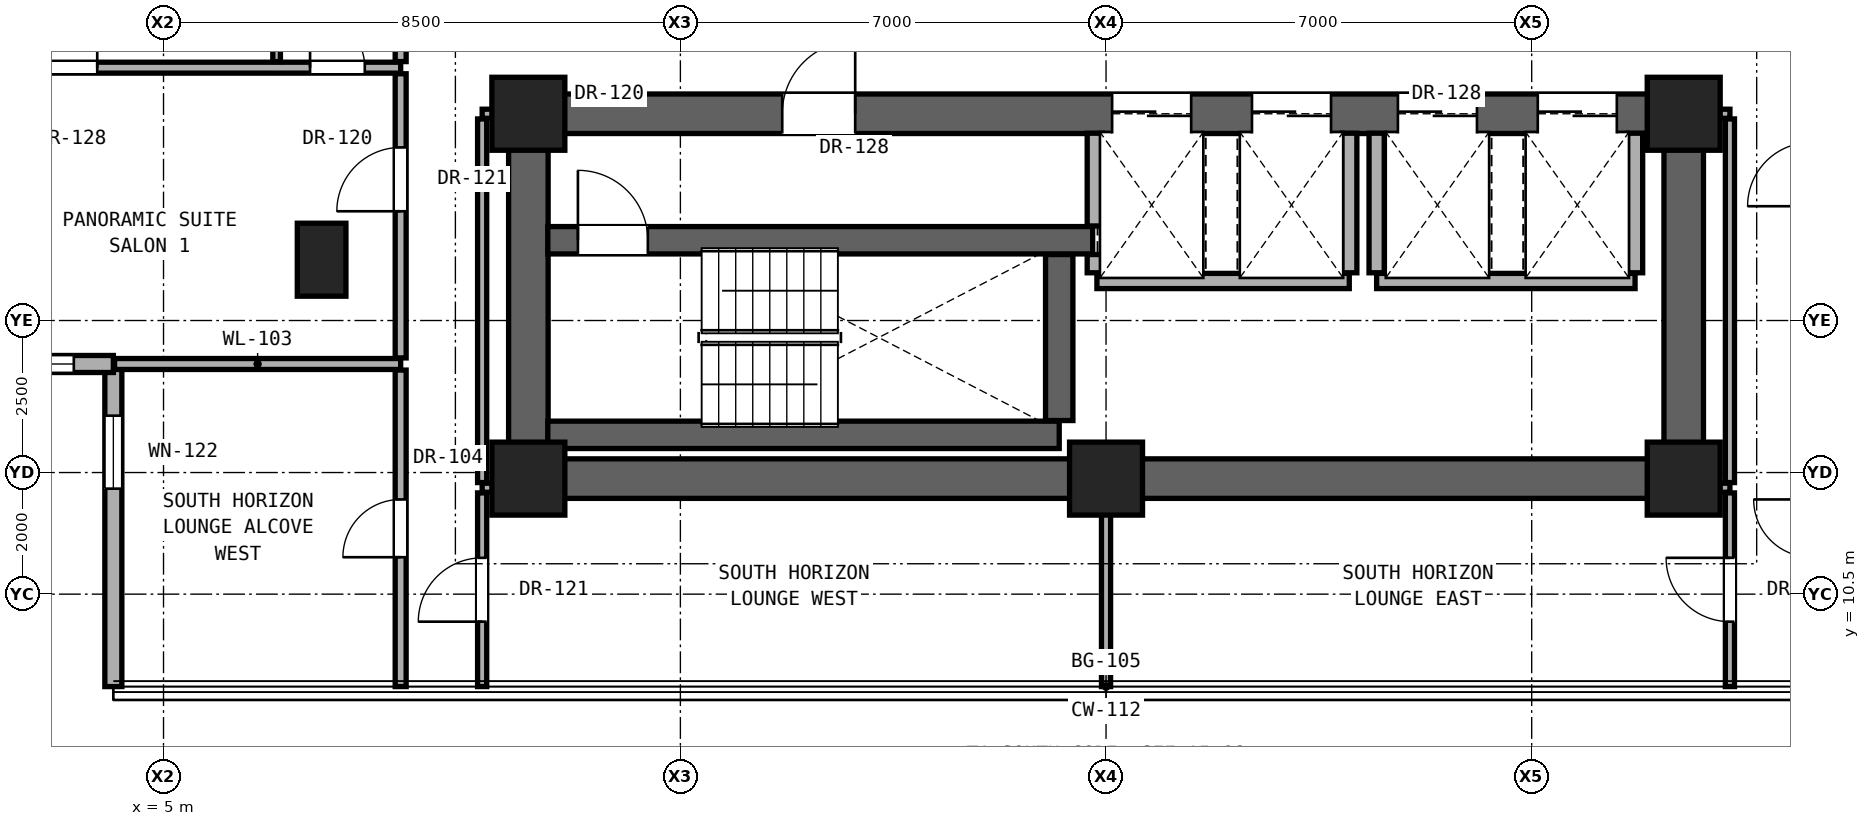
"""IFC4 building model, lengths in metres.
Left out: names, types, materials, properties, quantities, classifications, styles, units other than length and angle.
Written with IfcOpenShell. Run it as: python <this file> out.ifc"""

import sys

from ifc_helpers import new_model, si_unit, direction, frame, frame_2d, origin, origin_2d, place, context, subcontext, project, spatial, rectangle, extrude, element, fill, save


model = new_model("IFC4")
c1 = context("Model", 3, precision=1e-05, world=origin(), true_north=direction((0.0, 1.0)))
c2 = subcontext(c1, "Body", "Model", "MODEL_VIEW")
j1 = project(units=[si_unit("LENGTHUNIT", "METRE"), si_unit("PLANEANGLEUNIT", "RADIAN")], contexts=[c1])
p1 = place(None, origin())
s1 = spatial("IfcSite", under=j1, at=p1, CompositionType="ELEMENT")
p2 = place(p1, origin())
s2 = spatial("IfcBuilding", under=s1, at=p2, CompositionType="ELEMENT")
p3 = place(p2, frame((0.0, 0.0, 104.9)))
s3 = spatial("IfcBuildingStorey", under=s2, at=p3, CompositionType="ELEMENT", Elevation=104.9)
for number, where, z_axis, x_axis in (
    (1, (11.0, 12.4, 0.0), (0.0, 0.0, 1.0), (1.0, 0.0, 0.0)),
    (2, (20.5, 12.4, 0.0), (0.0, 0.0, 1.0), (1.0, 0.0, 0.0)),
    (3, (30.0, 12.4, 0.0), (0.0, 0.0, 1.0), (1.0, 0.0, 0.0)),
    (4, (11.0, 18.4, 0.0), (0.0, 0.0, 1.0), (1.0, 0.0, 0.0)),
    (5, (30.0, 18.4, 0.0), (0.0, 0.0, 1.0), (1.0, 0.0, 0.0)),
):
    element("IfcColumn", number, at=place(p3, frame(where, z_axis=z_axis, x_axis=x_axis)), inside=s3, PredefinedType="COLUMN", context=c2, shape_type="SweptSolid", body=[
        extrude(rectangle(XDim=1.2, YDim=1.2, at=origin_2d()), origin(), (0.0, 0.0, 1.0), 3.3),
    ])
p4 = place(p3, frame((7.6, 16.0, 0.0), z_axis=(0.0, 0.0, 1.0), x_axis=(1.0, 0.0, 0.0)))
e6 = element("IfcColumn", 6, at=p4, inside=s3, PredefinedType="PILASTER", context=c2, shape_type="SweptSolid", body=[
    extrude(rectangle(XDim=0.8, YDim=1.2, at=origin_2d()), origin(), (0.0, 0.0, 1.0), 3.3),
])
p5 = place(p3, frame((11.0, 12.4, 0.0), z_axis=(0.0, 0.0, 1.0), x_axis=(1.0, 0.0, 0.0)))
e7 = element("IfcWall", 7, at=p5, inside=s3, PredefinedType="SHEAR", context=c2, shape_type="SweptSolid", body=[
    extrude(rectangle(XDim=19.0, YDim=0.65, at=frame_2d((9.5, 0.0))), origin(), (0.0, 0.0, 1.0), 3.08),
])
for number, where, z_axis, x_axis in (
    (8, (11.0, 12.4, 0.0), (0.0, 0.0, 1.0), (0.0, 1.0, 0.0)),
    (9, (30.0, 12.4, 0.0), (0.0, 0.0, 1.0), (0.0, 1.0, 0.0)),
):
    element("IfcWall", number, at=place(p3, frame(where, z_axis=z_axis, x_axis=x_axis)), inside=s3, PredefinedType="SHEAR", context=c2, shape_type="SweptSolid", body=[
        extrude(rectangle(XDim=6.0, YDim=0.65, at=frame_2d((3.0, 0.0))), origin(), (0.0, 0.0, 1.0), 3.08),
    ])
p6 = place(p3, frame((11.0, 18.4, 0.0), z_axis=(0.0, 0.0, 1.0), x_axis=(1.0, 0.0, 0.0)))
e10 = element("IfcWall", 10, at=p6, inside=s3, PredefinedType="SHEAR", context=c2, shape_type="SweptSolid", body=[
    extrude(rectangle(XDim=19.0, YDim=0.65, at=frame_2d((9.5, 0.0))), origin(), (0.0, 0.0, 1.0), 3.08),
])
p7 = place(p6, frame((4.175, 0.0, 0.0)))
e11 = element("IfcOpeningElement", 11, at=p7, cuts=e10, PredefinedType="OPENING", context=c2, shape_type="SweptSolid", body=[
    extrude(rectangle(XDim=1.2, YDim=2.25, at=frame_2d((0.6, 1.125))), frame((0.0, 0.335, 0.0), z_axis=(0.0, -1.0, 0.0), x_axis=(1.0, 0.0, 0.0)), (0.0, 0.0, 1.0), 0.67),
])
p8 = place(p6, frame((9.6, 0.0, 0.0)))
e12 = element("IfcOpeningElement", 12, at=p8, cuts=e10, PredefinedType="OPENING", context=c2, shape_type="SweptSolid", body=[
    extrude(rectangle(XDim=1.3, YDim=2.3, at=frame_2d((0.65, 1.15))), frame((0.0, 0.335, 0.0), z_axis=(0.0, -1.0, 0.0), x_axis=(1.0, 0.0, 0.0)), (0.0, 0.0, 1.0), 0.67),
])
p9 = place(p6, frame((11.9, 0.0, 0.0)))
e13 = element("IfcOpeningElement", 13, at=p9, cuts=e10, PredefinedType="OPENING", context=c2, shape_type="SweptSolid", body=[
    extrude(rectangle(XDim=1.3, YDim=2.3, at=frame_2d((0.65, 1.15))), frame((0.0, 0.335, 0.0), z_axis=(0.0, -1.0, 0.0), x_axis=(1.0, 0.0, 0.0)), (0.0, 0.0, 1.0), 0.67),
])
p10 = place(p6, frame((14.3, 0.0, 0.0)))
e14 = element("IfcOpeningElement", 14, at=p10, cuts=e10, PredefinedType="OPENING", context=c2, shape_type="SweptSolid", body=[
    extrude(rectangle(XDim=1.3, YDim=2.3, at=frame_2d((0.65, 1.15))), frame((0.0, 0.335, 0.0), z_axis=(0.0, -1.0, 0.0), x_axis=(1.0, 0.0, 0.0)), (0.0, 0.0, 1.0), 0.67),
])
p11 = place(p6, frame((16.6, 0.0, 0.0)))
e15 = element("IfcOpeningElement", 15, at=p11, cuts=e10, PredefinedType="OPENING", context=c2, shape_type="SweptSolid", body=[
    extrude(rectangle(XDim=1.3, YDim=2.3, at=frame_2d((0.65, 1.15))), frame((0.0, 0.335, 0.0), z_axis=(0.0, -1.0, 0.0), x_axis=(1.0, 0.0, 0.0)), (0.0, 0.0, 1.0), 0.67),
])
p12 = place(p3, frame((4.175, 14.285, 0.0), z_axis=(0.0, 0.0, 1.0), x_axis=(0.0, -1.0, 0.0)))
e16 = element("IfcWall", 16, at=p12, inside=s3, PredefinedType="SOLIDWALL", context=c2, shape_type="SweptSolid", body=[
    extrude(rectangle(XDim=5.305, YDim=0.28, at=frame_2d((2.652, 0.0))), origin(), (0.0, 0.0, 1.0), 3.06),
])
p13 = place(p12, frame((0.85, 0.0, 0.81)))
e17 = element("IfcOpeningElement", 17, at=p13, cuts=e16, PredefinedType="OPENING", context=c2, shape_type="SweptSolid", body=[
    extrude(rectangle(XDim=1.2, YDim=2.1, at=frame_2d((0.6, 1.05))), frame((0.0, 0.15, 0.0), z_axis=(0.0, -1.0, 0.0), x_axis=(1.0, 0.0, 0.0)), (0.0, 0.0, 1.0), 0.3),
])
p14 = place(p3, frame((-1.13, 14.285, 0.0), z_axis=(0.0, 0.0, 1.0), x_axis=(1.0, 0.0, 0.0)))
e18 = element("IfcWall", 18, at=p14, inside=s3, PredefinedType="SOLIDWALL", context=c2, shape_type="SweptSolid", body=[
    extrude(rectangle(XDim=5.305, YDim=0.28, at=frame_2d((2.652, 0.0))), origin(), (0.0, 0.0, 1.0), 3.06),
])
p15 = place(p14, frame((3.555, 0.0, 0.85)))
e19 = element("IfcOpeningElement", 19, at=p15, cuts=e18, PredefinedType="OPENING", context=c2, shape_type="SweptSolid", body=[
    extrude(rectangle(XDim=1.1, YDim=2.0, at=frame_2d((0.55, 1.0))), frame((0.0, 0.15, 0.0), z_axis=(0.0, -1.0, 0.0), x_axis=(1.0, 0.0, 0.0)), (0.0, 0.0, 1.0), 0.3),
])
for number, where, z_axis, x_axis in (
    (20, (10.24, 12.25, 0.0), (0.0, 0.0, 1.0), (1.0, 0.0, 0.0)),
    (21, (30.32, 12.25, 0.0), (0.0, 0.0, 1.0), (1.0, 0.0, 0.0)),
):
    element("IfcWall", number, at=place(p3, frame(where, z_axis=z_axis, x_axis=x_axis)), inside=s3, PredefinedType="PARTITIONING", context=c2, shape_type="SweptSolid", body=[
        extrude(rectangle(XDim=0.44, YDim=0.15, at=frame_2d((0.22, 0.0))), origin(), (0.0, 0.0, 1.0), 3.08),
    ])
p16 = place(p3, frame((11.32, 13.12, 0.0), z_axis=(0.0, 0.0, 1.0), x_axis=(1.0, 0.0, 0.0)))
e22 = element("IfcWall", 22, at=p16, inside=s3, PredefinedType="SHEAR", context=c2, shape_type="SweptSolid", body=[
    extrude(rectangle(XDim=8.41, YDim=0.45, at=frame_2d((4.205, 0.0))), origin(), (0.0, 0.0, 1.0), 3.08),
])
p17 = place(p3, frame((4.195, 14.285, 0.0), z_axis=(0.0, 0.0, 1.0), x_axis=(1.0, 0.0, 0.0)))
e23 = element("IfcWall", 23, at=p17, inside=s3, PredefinedType="PARTITIONING", context=c2, shape_type="SweptSolid", body=[
    extrude(rectangle(XDim=4.705, YDim=0.18, at=frame_2d((2.353, 0.0))), origin(), (0.0, 0.0, 1.0), 3.08),
])
p18 = place(p3, frame((20.35, 15.65, 0.0), z_axis=(0.0, 0.0, 1.0), x_axis=(1.0, 0.0, 0.0)))
e24 = element("IfcWall", 24, at=p18, inside=s3, PredefinedType="SOLIDWALL", context=c2, shape_type="SweptSolid", body=[
    extrude(rectangle(XDim=4.15, YDim=0.25, at=frame_2d((2.075, 0.0))), origin(), (0.0, 0.0, 1.0), 3.08),
])
p19 = place(p3, frame((24.95, 15.65, 0.0), z_axis=(0.0, 0.0, 1.0), x_axis=(1.0, 0.0, 0.0)))
e25 = element("IfcWall", 25, at=p19, inside=s3, PredefinedType="SOLIDWALL", context=c2, shape_type="SweptSolid", body=[
    extrude(rectangle(XDim=4.25, YDim=0.25, at=frame_2d((2.125, 0.0))), origin(), (0.0, 0.0, 1.0), 3.08),
])
p20 = place(p3, frame((11.32, 16.32, 0.0), z_axis=(0.0, 0.0, 1.0), x_axis=(1.0, 0.0, 0.0)))
e26 = element("IfcWall", 26, at=p20, inside=s3, PredefinedType="SHEAR", context=c2, shape_type="SweptSolid", body=[
    extrude(rectangle(XDim=8.96, YDim=0.45, at=frame_2d((4.48, 0.0))), origin(), (0.0, 0.0, 1.0), 3.08),
])
p21 = place(p20, frame((0.495, 0.0, 0.0)))
e27 = element("IfcOpeningElement", 27, at=p21, cuts=e26, PredefinedType="OPENING", context=c2, shape_type="SweptSolid", body=[
    extrude(rectangle(XDim=1.15, YDim=2.2, at=frame_2d((0.575, 1.1))), frame((0.0, 0.235, 0.0), z_axis=(0.0, -1.0, 0.0), x_axis=(1.0, 0.0, 0.0)), (0.0, 0.0, 1.0), 0.47),
])
for number, where, z_axis, x_axis in (
    (28, (10.24, 18.4, 0.0), (0.0, 0.0, 1.0), (1.0, 0.0, 0.0)),
    (29, (30.32, 18.4, 0.0), (0.0, 0.0, 1.0), (1.0, 0.0, 0.0)),
):
    element("IfcWall", number, at=place(p3, frame(where, z_axis=z_axis, x_axis=x_axis)), inside=s3, PredefinedType="PARTITIONING", context=c2, shape_type="SweptSolid", body=[
        extrude(rectangle(XDim=0.44, YDim=0.15, at=frame_2d((0.22, 0.0))), origin(), (0.0, 0.0, 1.0), 2.456),
    ])
p22 = place(p3, frame((-1.13, 19.158, 0.0), z_axis=(0.0, 0.0, 1.0), x_axis=(1.0, 0.0, 0.0)))
e30 = element("IfcWall", 30, at=p22, inside=s3, PredefinedType="PARTITIONING", context=c2, shape_type="SweptSolid", body=[
    extrude(rectangle(XDim=10.03, YDim=0.18, at=frame_2d((5.015, 0.0))), origin(), (0.0, 0.0, 1.0), 2.145),
])
p23 = place(p22, frame((4.19, 0.0, 0.0)))
e31 = element("IfcOpeningElement", 31, at=p23, cuts=e30, PredefinedType="OPENING", context=c2, shape_type="SweptSolid", body=[
    extrude(rectangle(XDim=0.85, YDim=2.01, at=frame_2d((0.425, 1.005))), frame((0.0, 0.1, 0.0), z_axis=(0.0, -1.0, 0.0), x_axis=(1.0, 0.0, 0.0)), (0.0, 0.0, 1.0), 0.2),
])
p24 = place(p22, frame((8.54, 0.0, 0.0)))
e32 = element("IfcOpeningElement", 32, at=p24, cuts=e30, PredefinedType="OPENING", context=c2, shape_type="SweptSolid", body=[
    extrude(rectangle(XDim=0.9, YDim=2.1, at=frame_2d((0.45, 1.05))), frame((0.0, 0.1, 0.0), z_axis=(0.0, -1.0, 0.0), x_axis=(1.0, 0.0, 0.0)), (0.0, 0.0, 1.0), 0.2),
])
p25 = place(p3, frame((6.86, 19.258, 0.0), z_axis=(0.0, 0.0, 1.0), x_axis=(0.0, 1.0, 0.0)))
e33 = element("IfcWall", 33, at=p25, inside=s3, PredefinedType="PARTITIONING", context=c2, shape_type="SweptSolid", body=[
    extrude(rectangle(XDim=2.52, YDim=0.125, at=frame_2d((1.26, 0.0))), origin(), (0.0, 0.0, 1.0), 3.08),
])
p26 = place(p3, frame((8.9, 8.98, 0.0), z_axis=(0.0, 0.0, 1.0), x_axis=(0.0, 1.0, 0.0)))
e34 = element("IfcWall", 34, at=p26, inside=s3, PredefinedType="PARTITIONING", context=c2, shape_type="SweptSolid", body=[
    extrude(rectangle(XDim=5.205, YDim=0.18, at=frame_2d((2.603, 0.0))), origin(), (0.0, 0.0, 1.0), 3.08),
])
p27 = place(p26, frame((2.127, 0.0, 0.0)))
e35 = element("IfcOpeningElement", 35, at=p27, cuts=e34, PredefinedType="OPENING", context=c2, shape_type="SweptSolid", body=[
    extrude(rectangle(XDim=0.95, YDim=2.15, at=frame_2d((0.475, 1.075))), frame((0.0, 0.1, 0.0), z_axis=(0.0, -1.0, 0.0), x_axis=(1.0, 0.0, 0.0)), (0.0, 0.0, 1.0), 0.2),
])
p28 = place(p3, frame((8.9, 14.385, 0.0), z_axis=(0.0, 0.0, 1.0), x_axis=(0.0, 1.0, 0.0)))
e36 = element("IfcWall", 36, at=p28, inside=s3, PredefinedType="PARTITIONING", context=c2, shape_type="SweptSolid", body=[
    extrude(rectangle(XDim=4.673, YDim=0.18, at=frame_2d((2.336, 0.0))), origin(), (0.0, 0.0, 1.0), 2.456),
])
p29 = place(p28, frame((2.412, 0.0, 0.0)))
e37 = element("IfcOpeningElement", 37, at=p29, cuts=e36, PredefinedType="OPENING", context=c2, shape_type="SweptSolid", body=[
    extrude(rectangle(XDim=1.05, YDim=2.2, at=frame_2d((0.525, 1.1))), frame((0.0, 0.1, 0.0), z_axis=(0.0, -1.0, 0.0), x_axis=(1.0, 0.0, 0.0)), (0.0, 0.0, 1.0), 0.2),
])
p30 = place(p3, frame((8.9, 19.258, 0.0), z_axis=(0.0, 0.0, 1.0), x_axis=(0.0, 1.0, 0.0)))
e38 = element("IfcWall", 38, at=p30, inside=s3, PredefinedType="PARTITIONING", context=c2, shape_type="SweptSolid", body=[
    extrude(rectangle(XDim=2.52, YDim=0.18, at=frame_2d((1.26, 0.0))), origin(), (0.0, 0.0, 1.0), 3.08),
])
p31 = place(p3, frame((10.24, 8.98, 0.0), z_axis=(0.0, 0.0, 1.0), x_axis=(0.0, 1.0, 0.0)))
e39 = element("IfcWall", 39, at=p31, inside=s3, PredefinedType="PARTITIONING", context=c2, shape_type="SweptSolid", body=[
    extrude(rectangle(XDim=3.185, YDim=0.15, at=frame_2d((1.593, 0.0))), origin(), (0.0, 0.0, 1.0), 3.08),
])
p32 = place(p31, frame((1.067, 0.0, 0.0)))
e40 = element("IfcOpeningElement", 40, at=p32, cuts=e39, PredefinedType="OPENING", context=c2, shape_type="SweptSolid", body=[
    extrude(rectangle(XDim=1.05, YDim=2.2, at=frame_2d((0.525, 1.1))), frame((0.0, 0.085, 0.0), z_axis=(0.0, -1.0, 0.0), x_axis=(1.0, 0.0, 0.0)), (0.0, 0.0, 1.0), 0.17),
])
p33 = place(p3, frame((10.24, 12.335, 0.0), z_axis=(0.0, 0.0, 1.0), x_axis=(0.0, 1.0, 0.0)))
e41 = element("IfcWall", 41, at=p33, inside=s3, PredefinedType="PARTITIONING", context=c2, shape_type="SweptSolid", body=[
    extrude(rectangle(XDim=5.98, YDim=0.15, at=frame_2d((2.99, 0.0))), origin(), (0.0, 0.0, 1.0), 2.456),
])
p34 = place(p3, frame((19.73, 13.355, 0.0), z_axis=(0.0, 0.0, 1.0), x_axis=(0.0, 1.0, 0.0)))
e42 = element("IfcWall", 42, at=p34, inside=s3, PredefinedType="SHEAR", context=c2, shape_type="SweptSolid", body=[
    extrude(rectangle(XDim=2.73, YDim=0.45, at=frame_2d((1.365, 0.0))), origin(), (0.0, 0.0, 1.0), 3.08),
])
p35 = place(p3, frame((20.315, 15.785, 0.0), z_axis=(0.0, 0.0, 1.0), x_axis=(0.0, 1.0, 0.0)))
e43 = element("IfcWall", 43, at=p35, inside=s3, PredefinedType="SOLIDWALL", context=c2, shape_type="SweptSolid", body=[
    extrude(rectangle(XDim=0.3, YDim=0.25, at=frame_2d((0.15, 0.0))), origin(), (0.0, 0.0, 1.0), 3.08),
])
p36 = place(p3, frame((20.315, 16.555, 0.0), z_axis=(0.0, 0.0, 1.0), x_axis=(0.0, 1.0, 0.0)))
e44 = element("IfcWall", 44, at=p36, inside=s3, PredefinedType="SOLIDWALL", context=c2, shape_type="SweptSolid", body=[
    extrude(rectangle(XDim=1.525, YDim=0.25, at=frame_2d((0.763, 0.0))), origin(), (0.0, 0.0, 1.0), 3.08),
])
p37 = place(p3, frame((20.5, 8.98, 0.0), z_axis=(0.0, 0.0, 1.0), x_axis=(0.0, 1.0, 0.0)))
e45 = element("IfcWall", 45, at=p37, inside=s3, PredefinedType="PARTITIONING", context=c2, shape_type="SweptSolid", body=[
    extrude(rectangle(XDim=3.1, YDim=0.15, at=frame_2d((1.55, 0.0))), origin(), (0.0, 0.0, 1.0), 3.08),
])
for number, where, z_axis, x_axis in (
    (46, (24.5, 15.785, 0.0), (0.0, 0.0, 1.0), (0.0, 1.0, 0.0)),
    (47, (24.95, 15.785, 0.0), (0.0, 0.0, 1.0), (0.0, 1.0, 0.0)),
    (48, (29.2, 15.785, 0.0), (0.0, 0.0, 1.0), (0.0, 1.0, 0.0)),
):
    element("IfcWall", number, at=place(p3, frame(where, z_axis=z_axis, x_axis=x_axis)), inside=s3, PredefinedType="SOLIDWALL", context=c2, shape_type="SweptSolid", body=[
        extrude(rectangle(XDim=2.295, YDim=0.25, at=frame_2d((1.147, 0.0))), origin(), (0.0, 0.0, 1.0), 3.08),
    ])
p38 = place(p3, frame((30.76, 8.98, 0.0), z_axis=(0.0, 0.0, 1.0), x_axis=(0.0, 1.0, 0.0)))
e49 = element("IfcWall", 49, at=p38, inside=s3, PredefinedType="PARTITIONING", context=c2, shape_type="SweptSolid", body=[
    extrude(rectangle(XDim=3.185, YDim=0.15, at=frame_2d((1.593, 0.0))), origin(), (0.0, 0.0, 1.0), 3.08),
])
p39 = place(p38, frame((1.067, 0.0, 0.0)))
e50 = element("IfcOpeningElement", 50, at=p39, cuts=e49, PredefinedType="OPENING", context=c2, shape_type="SweptSolid", body=[
    extrude(rectangle(XDim=1.05, YDim=2.2, at=frame_2d((0.525, 1.1))), frame((0.0, 0.085, 0.0), z_axis=(0.0, -1.0, 0.0), x_axis=(1.0, 0.0, 0.0)), (0.0, 0.0, 1.0), 0.17),
])
p40 = place(p3, frame((30.76, 12.335, 0.0), z_axis=(0.0, 0.0, 1.0), x_axis=(0.0, 1.0, 0.0)))
e51 = element("IfcWall", 51, at=p40, inside=s3, PredefinedType="PARTITIONING", context=c2, shape_type="SweptSolid", body=[
    extrude(rectangle(XDim=5.98, YDim=0.15, at=frame_2d((2.99, 0.0))), origin(), (0.0, 0.0, 1.0), 2.456),
])
p41 = place(p13, origin())
e52 = element("IfcWindow", 52, at=p41, inside=s3, PartitioningType="SINGLE_PANEL", PredefinedType="WINDOW", context=c2, shape_type="SweptSolid", body=[
    extrude(rectangle(XDim=1.2, YDim=2.1, at=frame_2d((0.6, 1.05))), frame((0.0, 0.03, 0.0), z_axis=(0.0, -1.0, 0.0), x_axis=(1.0, 0.0, 0.0)), (0.0, 0.0, 1.0), 0.06),
])
fill(e17, e52)
p42 = place(p15, origin())
e53 = element("IfcWindow", 53, at=p42, inside=s3, PartitioningType="SINGLE_PANEL", PredefinedType="WINDOW", context=c2, shape_type="SweptSolid", body=[
    extrude(rectangle(XDim=1.1, YDim=2.0, at=frame_2d((0.55, 1.0))), frame((0.0, 0.03, 0.0), z_axis=(0.0, -1.0, 0.0), x_axis=(1.0, 0.0, 0.0)), (0.0, 0.0, 1.0), 0.06),
])
fill(e19, e53)
p43 = place(p7, origin())
e54 = element("IfcDoor", 54, at=p43, inside=s3, OperationType="SINGLE_SWING_RIGHT", PredefinedType="DOOR", context=c2, shape_type="SweptSolid", body=[
    extrude(rectangle(XDim=1.2, YDim=2.25, at=frame_2d((0.6, 1.125))), frame((0.0, 0.025, 0.0), z_axis=(0.0, -1.0, 0.0), x_axis=(1.0, 0.0, 0.0)), (0.0, 0.0, 1.0), 0.05),
])
fill(e11, e54)
p44 = place(p21, origin())
e55 = element("IfcDoor", 55, at=p44, inside=s3, OperationType="SINGLE_SWING_LEFT", PredefinedType="DOOR", context=c2, shape_type="SweptSolid", body=[
    extrude(rectangle(XDim=1.15, YDim=2.2, at=frame_2d((0.575, 1.1))), frame((0.0, 0.025, 0.0), z_axis=(0.0, -1.0, 0.0), x_axis=(1.0, 0.0, 0.0)), (0.0, 0.0, 1.0), 0.05),
])
fill(e27, e55)
p45 = place(p29, origin())
e56 = element("IfcDoor", 56, at=p45, inside=s3, OperationType="SINGLE_SWING_LEFT", PredefinedType="DOOR", context=c2, shape_type="SweptSolid", body=[
    extrude(rectangle(XDim=1.05, YDim=2.2, at=frame_2d((0.525, 1.1))), frame((0.0, 0.025, 0.0), z_axis=(0.0, -1.0, 0.0), x_axis=(1.0, 0.0, 0.0)), (0.0, 0.0, 1.0), 0.05),
])
fill(e37, e56)
p46 = place(p23, origin())
e57 = element("IfcDoor", 57, at=p46, inside=s3, OperationType="SINGLE_SWING_RIGHT", PredefinedType="DOOR", context=c2, shape_type="SweptSolid", body=[
    extrude(rectangle(XDim=0.85, YDim=2.01, at=frame_2d((0.425, 1.005))), frame((0.0, 0.025, 0.0), z_axis=(0.0, -1.0, 0.0), x_axis=(1.0, 0.0, 0.0)), (0.0, 0.0, 1.0), 0.05),
])
fill(e31, e57)
p47 = place(p24, origin())
e58 = element("IfcDoor", 58, at=p47, inside=s3, OperationType="SINGLE_SWING_LEFT", PredefinedType="DOOR", context=c2, shape_type="SweptSolid", body=[
    extrude(rectangle(XDim=0.9, YDim=2.1, at=frame_2d((0.45, 1.05))), frame((0.0, 0.025, 0.0), z_axis=(0.0, -1.0, 0.0), x_axis=(1.0, 0.0, 0.0)), (0.0, 0.0, 1.0), 0.05),
])
fill(e32, e58)
p48 = place(p32, origin())
e59 = element("IfcDoor", 59, at=p48, inside=s3, OperationType="SINGLE_SWING_LEFT", PredefinedType="DOOR", context=c2, shape_type="SweptSolid", body=[
    extrude(rectangle(XDim=1.05, YDim=2.2, at=frame_2d((0.525, 1.1))), frame((0.0, 0.025, 0.0), z_axis=(0.0, -1.0, 0.0), x_axis=(1.0, 0.0, 0.0)), (0.0, 0.0, 1.0), 0.05),
])
fill(e40, e59)
p49 = place(p39, origin())
e60 = element("IfcDoor", 60, at=p49, inside=s3, OperationType="SINGLE_SWING_RIGHT", PredefinedType="DOOR", context=c2, shape_type="SweptSolid", body=[
    extrude(rectangle(XDim=1.05, YDim=2.2, at=frame_2d((0.525, 1.1))), frame((0.0, 0.025, 0.0), z_axis=(0.0, -1.0, 0.0), x_axis=(1.0, 0.0, 0.0)), (0.0, 0.0, 1.0), 0.05),
])
fill(e50, e60)
p50 = place(p27, origin())
e61 = element("IfcDoor", 61, at=p50, inside=s3, OperationType="SINGLE_SWING_LEFT", PredefinedType="DOOR", context=c2, shape_type="SweptSolid", body=[
    extrude(rectangle(XDim=0.95, YDim=2.15, at=frame_2d((0.475, 1.075))), frame((0.0, 0.025, 0.0), z_axis=(0.0, -1.0, 0.0), x_axis=(1.0, 0.0, 0.0)), (0.0, 0.0, 1.0), 0.05),
])
fill(e35, e61)
p51 = place(p8, origin())
e62 = element("IfcDoor", 62, at=p51, inside=s3, OperationType="DOUBLE_DOOR_SLIDING", PredefinedType="DOOR", context=c2, shape_type="SweptSolid", body=[
    extrude(rectangle(XDim=1.3, YDim=2.3, at=frame_2d((0.65, 1.15))), frame((0.0, 0.025, 0.0), z_axis=(0.0, -1.0, 0.0), x_axis=(1.0, 0.0, 0.0)), (0.0, 0.0, 1.0), 0.05),
])
fill(e12, e62)
p52 = place(p9, origin())
e63 = element("IfcDoor", 63, at=p52, inside=s3, OperationType="DOUBLE_DOOR_SLIDING", PredefinedType="DOOR", context=c2, shape_type="SweptSolid", body=[
    extrude(rectangle(XDim=1.3, YDim=2.3, at=frame_2d((0.65, 1.15))), frame((0.0, 0.025, 0.0), z_axis=(0.0, -1.0, 0.0), x_axis=(1.0, 0.0, 0.0)), (0.0, 0.0, 1.0), 0.05),
])
fill(e13, e63)
p53 = place(p10, origin())
e64 = element("IfcDoor", 64, at=p53, inside=s3, OperationType="DOUBLE_DOOR_SLIDING", PredefinedType="DOOR", context=c2, shape_type="SweptSolid", body=[
    extrude(rectangle(XDim=1.3, YDim=2.3, at=frame_2d((0.65, 1.15))), frame((0.0, 0.025, 0.0), z_axis=(0.0, -1.0, 0.0), x_axis=(1.0, 0.0, 0.0)), (0.0, 0.0, 1.0), 0.05),
])
fill(e14, e64)
p54 = place(p11, origin())
e65 = element("IfcDoor", 65, at=p54, inside=s3, OperationType="DOUBLE_DOOR_SLIDING", PredefinedType="DOOR", context=c2, shape_type="SweptSolid", body=[
    extrude(rectangle(XDim=1.3, YDim=2.3, at=frame_2d((0.65, 1.15))), frame((0.0, 0.025, 0.0), z_axis=(0.0, -1.0, 0.0), x_axis=(1.0, 0.0, 0.0)), (0.0, 0.0, 1.0), 0.05),
])
fill(e15, e65)
save(model, sys.argv[1])
